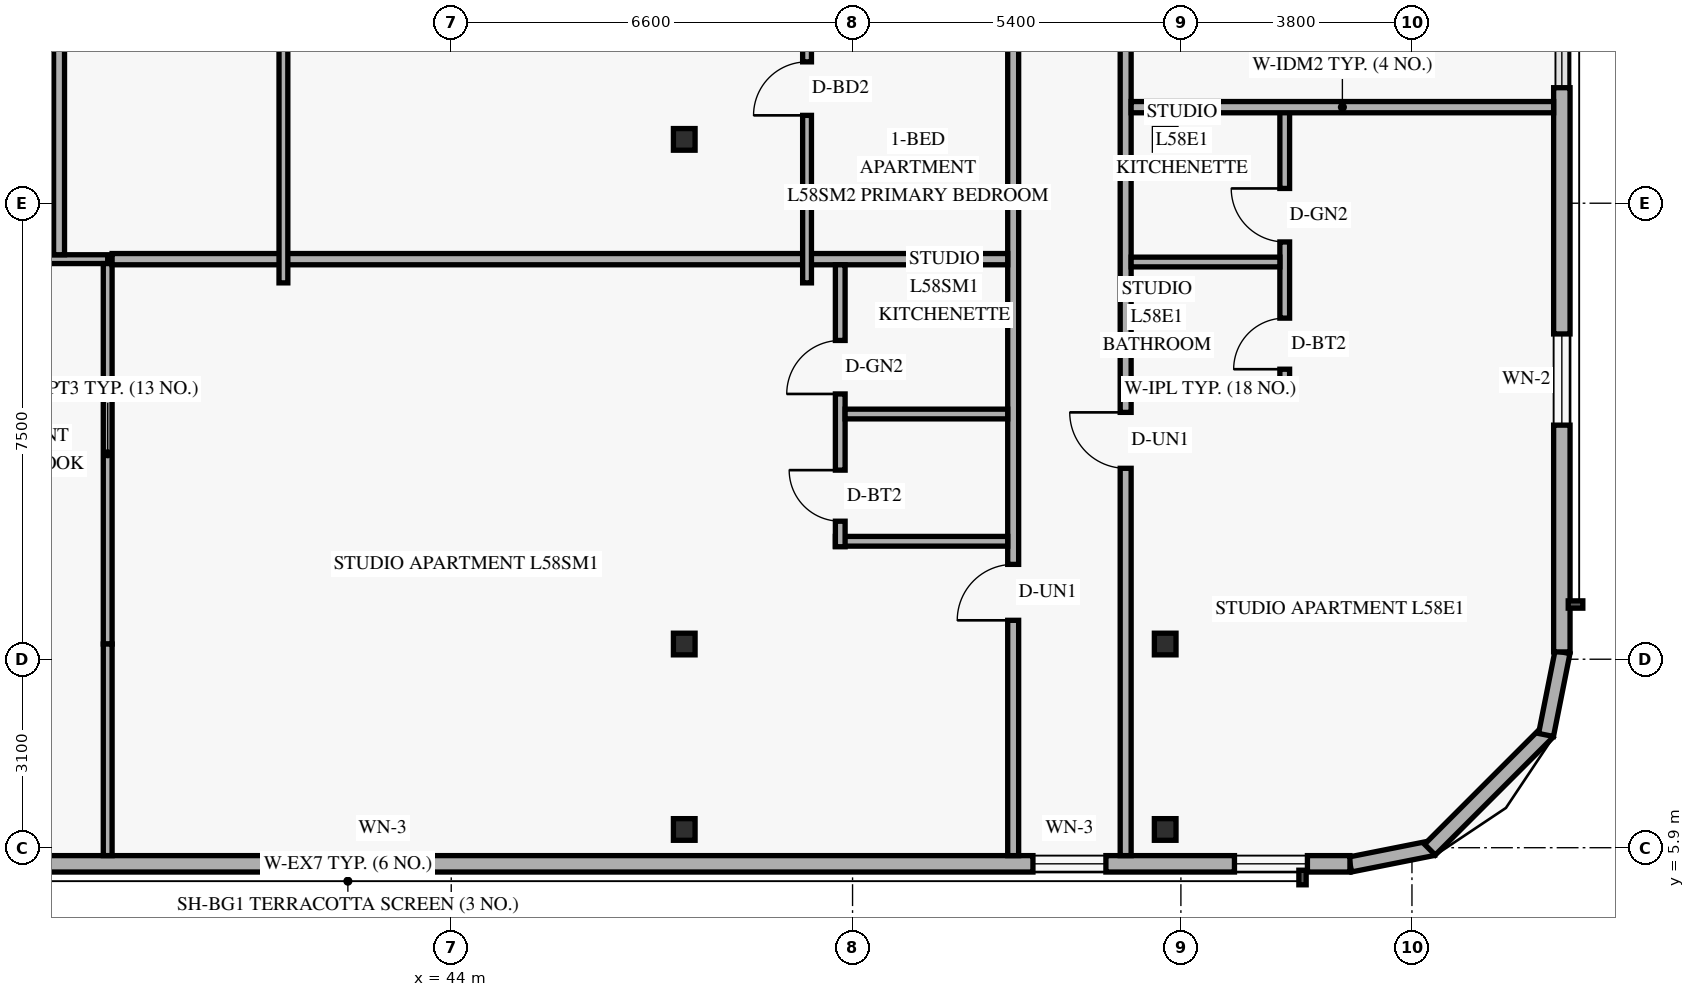
"""IFC4 building model, lengths in metres.
Left out: names, types, materials, properties, quantities, classifications, styles, units other than length and angle.
Written with IfcOpenShell. Run it as: python <this file> out.ifc"""

import sys

from ifc_helpers import new_model, si_unit, direction, frame, frame_2d, origin, origin_2d, place, context, subcontext, project, spatial, rectangle, hollow_rectangle, extrude, element, fill, save


model = new_model("IFC4")
c1 = context("Model", 3, precision=1e-05, world=origin(), true_north=direction((0.0, 1.0)))
c2 = subcontext(c1, "Body", "Model", "MODEL_VIEW")
j1 = project(units=[si_unit("LENGTHUNIT", "METRE"), si_unit("PLANEANGLEUNIT", "RADIAN")], contexts=[c1])
p1 = place(None, origin())
s1 = spatial("IfcSite", under=j1, at=p1, CompositionType="ELEMENT")
p2 = place(p1, origin())
s2 = spatial("IfcBuilding", under=s1, at=p2, CompositionType="ELEMENT")
p3 = place(p2, frame((0.0, 0.0, 223.8)))
s3 = spatial("IfcBuildingStorey", under=s2, at=p3, CompositionType="ELEMENT", Elevation=223.8)
for number, where, z_axis, x_axis in (
    (1, (47.769, 6.2, 0.0), (0.035, 0.0, 0.999), (0.0, 1.0, 0.0)),
    (2, (47.769, 9.25, 0.0), (0.035, 0.0, 0.999), (0.0, 1.0, 0.0)),
    (3, (47.769, 17.55, 0.0), (0.035, 0.0, 0.999), (0.0, 1.0, 0.0)),
):
    element("IfcColumn", number, at=place(p3, frame(where, z_axis=z_axis, x_axis=x_axis)), inside=s3, PredefinedType="COLUMN", context=c2, shape_type="SweptSolid", body=[
        extrude(hollow_rectangle(XDim=0.356, YDim=0.356, WallThickness=0.016, at=origin_2d()), origin(), (0.0, 0.0, 1.0), 3.602),
    ])
for number, where, z_axis, x_axis in (
    (4, (55.637, 6.2, 0.0), (0.058, 0.0, 0.998), (0.0, 1.0, 0.0)),
    (5, (55.637, 9.25, 0.0), (0.058, 0.0, 0.998), (0.0, 1.0, 0.0)),
    (6, (55.637, 17.55, 0.0), (0.058, 0.0, 0.998), (0.0, 1.0, 0.0)),
):
    element("IfcColumn", number, at=place(p3, frame(where, z_axis=z_axis, x_axis=x_axis)), inside=s3, PredefinedType="COLUMN", context=c2, shape_type="SweptSolid", body=[
        extrude(hollow_rectangle(XDim=0.356, YDim=0.356, WallThickness=0.016, at=origin_2d()), origin(), (0.0, 0.0, 1.0), 3.606),
    ])
p4 = place(p3, frame((58.783, 5.624, 0.0), z_axis=(0.0, 0.0, 1.0), x_axis=(0.980809899341, 0.19496651342, 0.0)))
e7 = element("IfcWall", 7, at=p4, inside=s3, PredefinedType="SOLIDWALL", context=c2, shape_type="SweptSolid", body=[
    extrude(rectangle(XDim=1.389, YDim=0.25, at=frame_2d((0.694, 0.0))), origin(), (0.0, 0.0, 1.0), 3.36),
])
p5 = place(p3, frame((60.095, 5.868, 0.0), z_axis=(0.0, 0.0, 1.0), x_axis=(0.707106781187, 0.707106781187, 0.0)))
e8 = element("IfcWall", 8, at=p5, inside=s3, PredefinedType="SOLIDWALL", context=c2, shape_type="SweptSolid", body=[
    extrude(rectangle(XDim=2.739, YDim=0.25, at=frame_2d((1.37, 0.0))), origin(), (0.0, 0.0, 1.0), 3.36),
])
p6 = place(p3, frame((62.005, 7.754, 0.0), z_axis=(0.0, 0.0, 1.0), x_axis=(0.195135625965, 0.9807762678, 0.0)))
e9 = element("IfcWall", 9, at=p6, inside=s3, PredefinedType="SOLIDWALL", context=c2, shape_type="SweptSolid", body=[
    extrude(rectangle(XDim=1.389, YDim=0.25, at=frame_2d((0.694, 0.0))), origin(), (0.0, 0.0, 1.0), 3.36),
])
p7 = place(p3, frame((25.82, 5.635, 0.0), z_axis=(0.0, 0.0, 1.0), x_axis=(1.0, 0.0, 0.0)))
e10 = element("IfcWall", 10, at=p7, inside=s3, PredefinedType="SOLIDWALL", context=c2, shape_type="SweptSolid", body=[
    extrude(rectangle(XDim=32.96, YDim=0.27, at=frame_2d((16.48, 0.0))), origin(), (0.0, 0.0, 1.0), 3.36),
])
p8 = place(p7, frame((3.87, 0.0, 0.85)))
e11 = element("IfcOpeningElement", 11, at=p8, cuts=e10, PredefinedType="OPENING", context=c2, shape_type="SweptSolid", body=[
    extrude(rectangle(XDim=1.2, YDim=1.5, at=frame_2d((0.6, 0.75))), frame((0.0, 0.145, 0.0), z_axis=(0.0, -1.0, 0.0), x_axis=(1.0, 0.0, 0.0)), (0.0, 0.0, 1.0), 0.29),
])
p9 = place(p7, frame((16.451, 0.0, 0.85)))
e12 = element("IfcOpeningElement", 12, at=p9, cuts=e10, PredefinedType="OPENING", context=c2, shape_type="SweptSolid", body=[
    extrude(rectangle(XDim=1.2, YDim=1.5, at=frame_2d((0.6, 0.75))), frame((0.0, 0.145, 0.0), z_axis=(0.0, -1.0, 0.0), x_axis=(1.0, 0.0, 0.0)), (0.0, 0.0, 1.0), 0.29),
])
p10 = place(p7, frame((27.747, 0.0, 0.85)))
e13 = element("IfcOpeningElement", 13, at=p10, cuts=e10, PredefinedType="OPENING", context=c2, shape_type="SweptSolid", body=[
    extrude(rectangle(XDim=1.2, YDim=1.5, at=frame_2d((0.6, 0.75))), frame((0.0, 0.145, 0.0), z_axis=(0.0, -1.0, 0.0), x_axis=(1.0, 0.0, 0.0)), (0.0, 0.0, 1.0), 0.29),
])
p11 = place(p7, frame((31.061, 0.0, 0.85)))
e14 = element("IfcOpeningElement", 14, at=p11, cuts=e10, PredefinedType="OPENING", context=c2, shape_type="SweptSolid", body=[
    extrude(rectangle(XDim=1.2, YDim=1.5, at=frame_2d((0.6, 0.75))), frame((0.0, 0.145, 0.0), z_axis=(0.0, -1.0, 0.0), x_axis=(1.0, 0.0, 0.0)), (0.0, 0.0, 1.0), 0.29),
])
p12 = place(p3, frame((62.265, 9.12, 0.0), z_axis=(0.0, 0.0, 1.0), x_axis=(0.0, 1.0, 0.0)))
e15 = element("IfcWall", 15, at=p12, inside=s3, PredefinedType="SOLIDWALL", context=c2, shape_type="SweptSolid", body=[
    extrude(rectangle(XDim=9.28, YDim=0.27, at=frame_2d((4.64, 0.0))), origin(), (0.0, 0.0, 1.0), 3.36),
])
p13 = place(p12, frame((3.73, 0.0, 0.85)))
e16 = element("IfcOpeningElement", 16, at=p13, cuts=e15, PredefinedType="OPENING", context=c2, shape_type="SweptSolid", body=[
    extrude(rectangle(XDim=1.5, YDim=1.55, at=frame_2d((0.75, 0.775))), frame((0.0, 0.145, 0.0), z_axis=(0.0, -1.0, 0.0), x_axis=(1.0, 0.0, 0.0)), (0.0, 0.0, 1.0), 0.29),
])
p14 = place(p3, frame((32.722, 15.58, 0.0), z_axis=(0.0, 0.0, 1.0), x_axis=(1.0, 0.0, 0.0)))
e17 = element("IfcWall", 17, at=p14, inside=s3, PredefinedType="PARTITIONING", context=c2, shape_type="SweptSolid", body=[
    extrude(rectangle(XDim=5.628, YDim=0.145, at=frame_2d((2.814, 0.0))), origin(), (0.0, 0.0, 1.0), 2.803),
])
p15 = place(p14, frame((0.778, 0.0, 0.0)))
e18 = element("IfcOpeningElement", 18, at=p15, cuts=e17, PredefinedType="OPENING", context=c2, shape_type="SweptSolid", body=[
    extrude(rectangle(XDim=0.9, YDim=2.1, at=frame_2d((0.45, 1.05))), frame((0.0, 0.083, 0.0), z_axis=(0.0, -1.0, 0.0), x_axis=(1.0, 0.0, 0.0)), (0.0, 0.0, 1.0), 0.165),
])
p16 = place(p14, frame((3.377, 0.0, 0.0)))
e19 = element("IfcOpeningElement", 19, at=p16, cuts=e17, PredefinedType="OPENING", context=c2, shape_type="SweptSolid", body=[
    extrude(rectangle(XDim=0.95, YDim=2.15, at=frame_2d((0.475, 1.075))), frame((0.0, 0.083, 0.0), z_axis=(0.0, -1.0, 0.0), x_axis=(1.0, 0.0, 0.0)), (0.0, 0.0, 1.0), 0.165),
])
p17 = place(p3, frame((38.35, 9.25, 0.0), z_axis=(0.0, 0.0, 1.0), x_axis=(0.0, 1.0, 0.0)))
e20 = element("IfcWall", 20, at=p17, inside=s3, PredefinedType="PARTITIONING", context=c2, shape_type="SweptSolid", body=[
    extrude(rectangle(XDim=6.258, YDim=0.145, at=frame_2d((3.129, 0.0))), origin(), (0.0, 0.0, 1.0), 2.803),
])
p18 = place(p3, frame((37.55, 15.653, 0.0), z_axis=(0.0, 0.0, 1.0), x_axis=(0.0, 1.0, 0.0)))
e21 = element("IfcWall", 21, at=p18, inside=s3, PredefinedType="STANDARD", context=c2, shape_type="SweptSolid", body=[
    extrude(rectangle(XDim=11.147, YDim=0.18, at=frame_2d((5.574, 0.0))), origin(), (0.0, 0.0, 1.0), 2.803),
])
p19 = place(p3, frame((53.242, 5.77, 0.0), z_axis=(0.0, 0.0, 1.0), x_axis=(0.0, 1.0, 0.0)))
e22 = element("IfcWall", 22, at=p19, inside=s3, PredefinedType="STANDARD", context=c2, shape_type="SweptSolid", body=[
    extrude(rectangle(XDim=21.03, YDim=0.18, at=frame_2d((10.515, 0.0))), origin(), (0.0, 0.0, 1.0), 2.803),
])
p20 = place(p19, frame((3.87, 0.0, 0.0)))
e23 = element("IfcOpeningElement", 23, at=p20, cuts=e22, PredefinedType="OPENING", context=c2, shape_type="SweptSolid", body=[
    extrude(rectangle(XDim=0.92, YDim=2.15, at=frame_2d((0.46, 1.075))), frame((0.0, 0.1, 0.0), z_axis=(0.0, -1.0, 0.0), x_axis=(1.0, 0.0, 0.0)), (0.0, 0.0, 1.0), 0.2),
])
p21 = place(p3, frame((55.092, 5.77, 0.0), z_axis=(0.0, 0.0, 1.0), x_axis=(0.0, 1.0, 0.0)))
e24 = element("IfcWall", 24, at=p21, inside=s3, PredefinedType="STANDARD", context=c2, shape_type="SweptSolid", body=[
    extrude(rectangle(XDim=36.46, YDim=0.18, at=frame_2d((18.23, 0.0))), origin(), (0.0, 0.0, 1.0), 2.803),
])
p22 = place(p21, frame((6.37, 0.0, 0.0)))
e25 = element("IfcOpeningElement", 25, at=p22, cuts=e24, PredefinedType="OPENING", context=c2, shape_type="SweptSolid", body=[
    extrude(rectangle(XDim=0.92, YDim=2.15, at=frame_2d((0.46, 1.075))), frame((0.0, 0.1, 0.0), z_axis=(0.0, -1.0, 0.0), x_axis=(1.0, 0.0, 0.0)), (0.0, 0.0, 1.0), 0.2),
])
p23 = place(p21, frame((15.243, 0.0, 0.0)))
e26 = element("IfcOpeningElement", 26, at=p23, cuts=e24, PredefinedType="OPENING", context=c2, shape_type="SweptSolid", body=[
    extrude(rectangle(XDim=0.92, YDim=2.15, at=frame_2d((0.46, 1.075))), frame((0.0, 0.1, 0.0), z_axis=(0.0, -1.0, 0.0), x_axis=(1.0, 0.0, 0.0)), (0.0, 0.0, 1.0), 0.2),
])
p24 = place(p21, frame((26.905, 0.0, 0.0)))
e27 = element("IfcOpeningElement", 27, at=p24, cuts=e24, PredefinedType="OPENING", context=c2, shape_type="SweptSolid", body=[
    extrude(rectangle(XDim=0.92, YDim=2.15, at=frame_2d((0.46, 1.075))), frame((0.0, 0.1, 0.0), z_axis=(0.0, -1.0, 0.0), x_axis=(1.0, 0.0, 0.0)), (0.0, 0.0, 1.0), 0.2),
])
p25 = place(p3, frame((55.182, 13.44, 0.0), z_axis=(0.0, 0.0, 1.0), x_axis=(1.0, 0.0, 0.0)))
e28 = element("IfcWall", 28, at=p25, inside=s3, PredefinedType="PLUMBINGWALL", context=c2, shape_type="SweptSolid", body=[
    extrude(rectangle(XDim=2.606, YDim=0.16, at=frame_2d((1.303, 0.0))), origin(), (0.0, 0.0, 1.0), 2.803),
])
p26 = place(p3, frame((57.708, 13.35, 0.0), z_axis=(0.0, 0.0, 1.0), x_axis=(0.0, 1.0, 0.0)))
e29 = element("IfcWall", 29, at=p26, inside=s3, PredefinedType="PLUMBINGWALL", context=c2, shape_type="SweptSolid", body=[
    extrude(rectangle(XDim=4.73, YDim=0.16, at=frame_2d((2.365, 0.0))), origin(), (0.0, 0.0, 1.0), 3.36),
])
p27 = place(p26, frame((0.42, 0.0, 0.0)))
e30 = element("IfcOpeningElement", 30, at=p27, cuts=e29, PredefinedType="OPENING", context=c2, shape_type="SweptSolid", body=[
    extrude(rectangle(XDim=0.84, YDim=2.12, at=frame_2d((0.42, 1.06))), frame((0.0, 0.09, 0.0), z_axis=(0.0, -1.0, 0.0), x_axis=(1.0, 0.0, 0.0)), (0.0, 0.0, 1.0), 0.18),
])
p28 = place(p26, frame((2.513, 0.0, 0.0)))
e31 = element("IfcOpeningElement", 31, at=p28, cuts=e29, PredefinedType="OPENING", context=c2, shape_type="SweptSolid", body=[
    extrude(rectangle(XDim=0.88, YDim=2.12, at=frame_2d((0.44, 1.06))), frame((0.0, 0.09, 0.0), z_axis=(0.0, -1.0, 0.0), x_axis=(1.0, 0.0, 0.0)), (0.0, 0.0, 1.0), 0.18),
])
p29 = place(p3, frame((55.182, 15.533, 0.0), z_axis=(0.0, 0.0, 1.0), x_axis=(1.0, 0.0, 0.0)))
e32 = element("IfcWall", 32, at=p29, inside=s3, PredefinedType="PLUMBINGWALL", context=c2, shape_type="SweptSolid", body=[
    extrude(rectangle(XDim=2.446, YDim=0.16, at=frame_2d((1.223, 0.0))), origin(), (0.0, 0.0, 1.0), 2.803),
])
p30 = place(p3, frame((55.182, 18.08, 0.0), z_axis=(0.0, 0.0, 1.0), x_axis=(1.0, 0.0, 0.0)))
e33 = element("IfcWall", 33, at=p30, inside=s3, PredefinedType="PARTITIONING", context=c2, shape_type="SweptSolid", body=[
    extrude(rectangle(XDim=6.948, YDim=0.185, at=frame_2d((3.474, 0.0))), origin(), (0.0, 0.0, 1.0), 2.803),
])
p31 = place(p3, frame((38.35, 5.77, 0.0), z_axis=(0.0, 0.0, 1.0), x_axis=(0.0, 1.0, 0.0)))
e34 = element("IfcWall", 34, at=p31, inside=s3, PredefinedType="PARTITIONING", context=c2, shape_type="SweptSolid", body=[
    extrude(rectangle(XDim=3.48, YDim=0.145, at=frame_2d((1.74, 0.0))), origin(), (0.0, 0.0, 1.0), 2.803),
])
p32 = place(p3, frame((38.423, 15.58, 0.0), z_axis=(0.0, 0.0, 1.0), x_axis=(1.0, 0.0, 0.0)))
e35 = element("IfcWall", 35, at=p32, inside=s3, PredefinedType="PARTITIONING", context=c2, shape_type="SweptSolid", body=[
    extrude(rectangle(XDim=14.729, YDim=0.185, at=frame_2d((7.365, 0.0))), origin(), (0.0, 0.0, 1.0), 2.803),
])
p33 = place(p3, frame((50.318, 10.94, 0.0), z_axis=(0.0, 0.0, 1.0), x_axis=(1.0, 0.0, 0.0)))
e36 = element("IfcWall", 36, at=p33, inside=s3, PredefinedType="PLUMBINGWALL", context=c2, shape_type="SweptSolid", body=[
    extrude(rectangle(XDim=2.834, YDim=0.16, at=frame_2d((1.417, 0.0))), origin(), (0.0, 0.0, 1.0), 3.36),
])
p34 = place(p3, frame((50.398, 10.85, 0.0), z_axis=(0.0, 0.0, 1.0), x_axis=(0.0, 1.0, 0.0)))
e37 = element("IfcWall", 37, at=p34, inside=s3, PredefinedType="PLUMBINGWALL", context=c2, shape_type="SweptSolid", body=[
    extrude(rectangle(XDim=4.637, YDim=0.16, at=frame_2d((2.319, 0.0))), origin(), (0.0, 0.0, 1.0), 3.039),
])
p35 = place(p34, frame((0.42, 0.0, 0.0)))
e38 = element("IfcOpeningElement", 38, at=p35, cuts=e37, PredefinedType="OPENING", context=c2, shape_type="SweptSolid", body=[
    extrude(rectangle(XDim=0.84, YDim=2.12, at=frame_2d((0.42, 1.06))), frame((0.0, 0.09, 0.0), z_axis=(0.0, -1.0, 0.0), x_axis=(1.0, 0.0, 0.0)), (0.0, 0.0, 1.0), 0.18),
])
p36 = place(p34, frame((2.513, 0.0, 0.0)))
e39 = element("IfcOpeningElement", 39, at=p36, cuts=e37, PredefinedType="OPENING", context=c2, shape_type="SweptSolid", body=[
    extrude(rectangle(XDim=0.88, YDim=2.12, at=frame_2d((0.44, 1.06))), frame((0.0, 0.09, 0.0), z_axis=(0.0, -1.0, 0.0), x_axis=(1.0, 0.0, 0.0)), (0.0, 0.0, 1.0), 0.18),
])
p37 = place(p3, frame((50.478, 13.033, 0.0), z_axis=(0.0, 0.0, 1.0), x_axis=(1.0, 0.0, 0.0)))
e40 = element("IfcWall", 40, at=p37, inside=s3, PredefinedType="PLUMBINGWALL", context=c2, shape_type="SweptSolid", body=[
    extrude(rectangle(XDim=2.674, YDim=0.16, at=frame_2d((1.337, 0.0))), origin(), (0.0, 0.0, 1.0), 3.36),
])
p38 = place(p3, frame((49.852, 15.19, 0.0), z_axis=(0.0, 0.0, 1.0), x_axis=(0.0, 1.0, 0.0)))
e41 = element("IfcWall", 41, at=p38, inside=s3, PredefinedType="PARTITIONING", context=c2, shape_type="SweptSolid", body=[
    extrude(rectangle(XDim=11.52, YDim=0.145, at=frame_2d((5.76, 0.0))), origin(), (0.0, 0.0, 1.0), 2.803),
])
p39 = place(p38, frame((2.755, 0.0, 0.0)))
e42 = element("IfcOpeningElement", 42, at=p39, cuts=e41, PredefinedType="OPENING", context=c2, shape_type="SweptSolid", body=[
    extrude(rectangle(XDim=0.88, YDim=2.14, at=frame_2d((0.44, 1.07))), frame((0.0, 0.083, 0.0), z_axis=(0.0, -1.0, 0.0), x_axis=(1.0, 0.0, 0.0)), (0.0, 0.0, 1.0), 0.165),
])
p40 = place(p38, frame((6.955, 0.0, 0.0)))
e43 = element("IfcOpeningElement", 43, at=p40, cuts=e41, PredefinedType="OPENING", context=c2, shape_type="SweptSolid", body=[
    extrude(rectangle(XDim=0.88, YDim=2.12, at=frame_2d((0.44, 1.06))), frame((0.0, 0.083, 0.0), z_axis=(0.0, -1.0, 0.0), x_axis=(1.0, 0.0, 0.0)), (0.0, 0.0, 1.0), 0.165),
])
p41 = place(p3, frame((41.24, 15.19, 0.0), z_axis=(0.0, 0.0, 1.0), x_axis=(0.0, 1.0, 0.0)))
e44 = element("IfcWall", 44, at=p41, inside=s3, PredefinedType="PARTITIONING", context=c2, shape_type="SweptSolid", body=[
    extrude(rectangle(XDim=11.52, YDim=0.145, at=frame_2d((5.76, 0.0))), origin(), (0.0, 0.0, 1.0), 2.803),
])
p42 = place(p41, frame((5.07, 0.0, 0.0)))
e45 = element("IfcOpeningElement", 45, at=p42, cuts=e44, PredefinedType="OPENING", context=c2, shape_type="SweptSolid", body=[
    extrude(rectangle(XDim=0.95, YDim=2.15, at=frame_2d((0.475, 1.075))), frame((0.0, 0.083, 0.0), z_axis=(0.0, -1.0, 0.0), x_axis=(1.0, 0.0, 0.0)), (0.0, 0.0, 1.0), 0.165),
])
p43 = place(p9, origin())
e46 = element("IfcWindow", 46, at=p43, inside=s3, PartitioningType="SINGLE_PANEL", PredefinedType="WINDOW", context=c2, shape_type="SweptSolid", body=[
    extrude(rectangle(XDim=1.2, YDim=1.5, at=frame_2d((0.6, 0.75))), frame((0.0, 0.03, 0.0), z_axis=(0.0, -1.0, 0.0), x_axis=(1.0, 0.0, 0.0)), (0.0, 0.0, 1.0), 0.06),
])
fill(e12, e46)
p44 = place(p10, origin())
e47 = element("IfcWindow", 47, at=p44, inside=s3, PartitioningType="SINGLE_PANEL", PredefinedType="WINDOW", context=c2, shape_type="SweptSolid", body=[
    extrude(rectangle(XDim=1.2, YDim=1.5, at=frame_2d((0.6, 0.75))), frame((0.0, 0.03, 0.0), z_axis=(0.0, -1.0, 0.0), x_axis=(1.0, 0.0, 0.0)), (0.0, 0.0, 1.0), 0.06),
])
fill(e13, e47)
p45 = place(p11, origin())
e48 = element("IfcWindow", 48, at=p45, inside=s3, PartitioningType="SINGLE_PANEL", PredefinedType="WINDOW", context=c2, shape_type="SweptSolid", body=[
    extrude(rectangle(XDim=1.2, YDim=1.5, at=frame_2d((0.6, 0.75))), frame((0.0, 0.03, 0.0), z_axis=(0.0, -1.0, 0.0), x_axis=(1.0, 0.0, 0.0)), (0.0, 0.0, 1.0), 0.06),
])
fill(e14, e48)
p46 = place(p13, origin())
e49 = element("IfcWindow", 49, at=p46, inside=s3, PartitioningType="SINGLE_PANEL", PredefinedType="WINDOW", context=c2, shape_type="SweptSolid", body=[
    extrude(rectangle(XDim=1.5, YDim=1.55, at=frame_2d((0.75, 0.775))), frame((0.0, 0.03, 0.0), z_axis=(0.0, -1.0, 0.0), x_axis=(1.0, 0.0, 0.0)), (0.0, 0.0, 1.0), 0.06),
])
fill(e16, e49)
p47 = place(p22, origin())
e50 = element("IfcDoor", 50, at=p47, inside=s3, OperationType="SINGLE_SWING_RIGHT", PredefinedType="DOOR", context=c2, shape_type="SweptSolid", body=[
    extrude(rectangle(XDim=0.92, YDim=2.15, at=frame_2d((0.46, 1.075))), frame((0.0, 0.025, 0.0), z_axis=(0.0, -1.0, 0.0), x_axis=(1.0, 0.0, 0.0)), (0.0, 0.0, 1.0), 0.05),
])
fill(e25, e50)
p48 = place(p27, origin())
e51 = element("IfcDoor", 51, at=p48, inside=s3, OperationType="SINGLE_SWING_LEFT", PredefinedType="DOOR", context=c2, shape_type="SweptSolid", body=[
    extrude(rectangle(XDim=0.84, YDim=2.12, at=frame_2d((0.42, 1.06))), frame((0.0, 0.025, 0.0), z_axis=(0.0, -1.0, 0.0), x_axis=(1.0, 0.0, 0.0)), (0.0, 0.0, 1.0), 0.05),
])
fill(e30, e51)
p49 = place(p28, origin())
e52 = element("IfcDoor", 52, at=p49, inside=s3, OperationType="SINGLE_SWING_RIGHT", PredefinedType="DOOR", context=c2, shape_type="SweptSolid", body=[
    extrude(rectangle(XDim=0.88, YDim=2.12, at=frame_2d((0.44, 1.06))), frame((0.0, 0.025, 0.0), z_axis=(0.0, -1.0, 0.0), x_axis=(1.0, 0.0, 0.0)), (0.0, 0.0, 1.0), 0.05),
])
fill(e31, e52)
p50 = place(p20, origin())
e53 = element("IfcDoor", 53, at=p50, inside=s3, OperationType="SINGLE_SWING_LEFT", PredefinedType="DOOR", context=c2, shape_type="SweptSolid", body=[
    extrude(rectangle(XDim=0.92, YDim=2.15, at=frame_2d((0.46, 1.075))), frame((0.0, 0.025, 0.0), z_axis=(0.0, -1.0, 0.0), x_axis=(1.0, 0.0, 0.0)), (0.0, 0.0, 1.0), 0.05),
])
fill(e23, e53)
p51 = place(p35, origin())
e54 = element("IfcDoor", 54, at=p51, inside=s3, OperationType="SINGLE_SWING_RIGHT", PredefinedType="DOOR", context=c2, shape_type="SweptSolid", body=[
    extrude(rectangle(XDim=0.84, YDim=2.12, at=frame_2d((0.42, 1.06))), frame((0.0, 0.025, 0.0), z_axis=(0.0, -1.0, 0.0), x_axis=(1.0, 0.0, 0.0)), (0.0, 0.0, 1.0), 0.05),
])
fill(e38, e54)
p52 = place(p36, origin())
e55 = element("IfcDoor", 55, at=p52, inside=s3, OperationType="SINGLE_SWING_LEFT", PredefinedType="DOOR", context=c2, shape_type="SweptSolid", body=[
    extrude(rectangle(XDim=0.88, YDim=2.12, at=frame_2d((0.44, 1.06))), frame((0.0, 0.025, 0.0), z_axis=(0.0, -1.0, 0.0), x_axis=(1.0, 0.0, 0.0)), (0.0, 0.0, 1.0), 0.05),
])
fill(e39, e55)
p53 = place(p39, origin())
e56 = element("IfcDoor", 56, at=p53, inside=s3, OperationType="SINGLE_SWING_LEFT", PredefinedType="DOOR", context=c2, shape_type="SweptSolid", body=[
    extrude(rectangle(XDim=0.88, YDim=2.14, at=frame_2d((0.44, 1.07))), frame((0.0, 0.025, 0.0), z_axis=(0.0, -1.0, 0.0), x_axis=(1.0, 0.0, 0.0)), (0.0, 0.0, 1.0), 0.05),
])
fill(e42, e56)
save(model, sys.argv[1])
